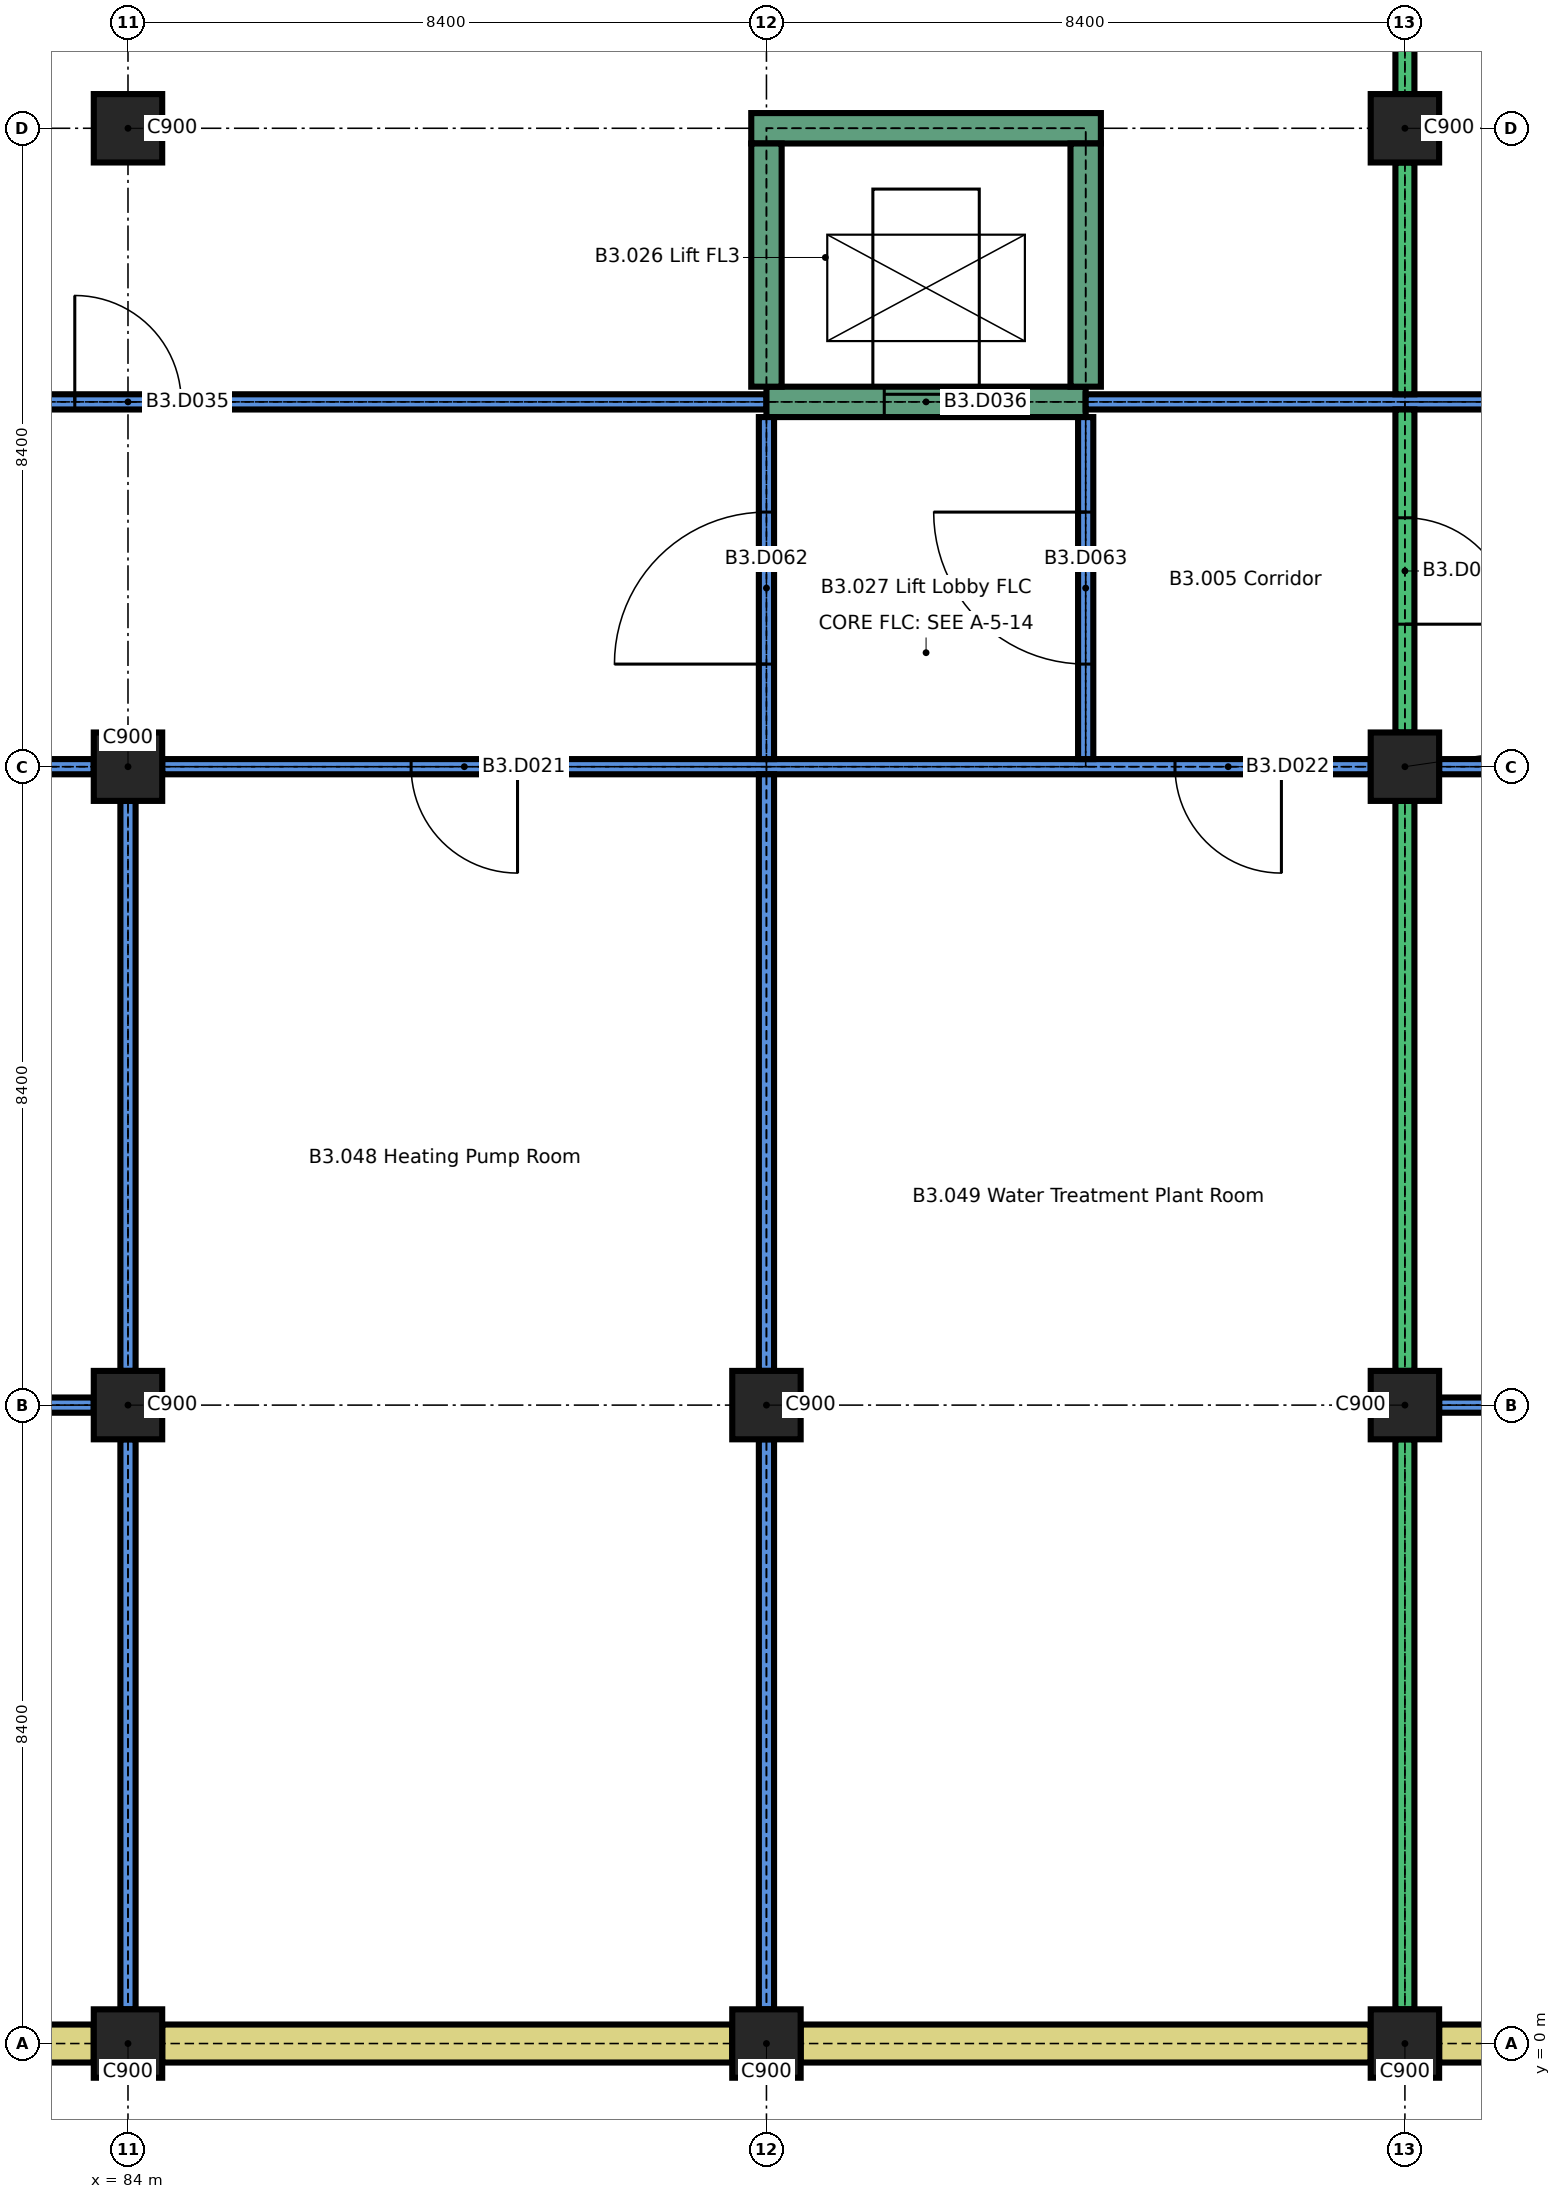
"""IFC4 building model, lengths in metres.
Left out: names, types, materials, properties, quantities, classifications, styles, units other than length and angle.
Written with IfcOpenShell. Run it as: python <this file> out.ifc"""

import sys

from ifc_helpers import new_model, si_unit, direction, frame, frame_2d, origin, origin_2d, place, context, subcontext, project, spatial, rectangle, extrude, element, fill, save


model = new_model("IFC4")
c1 = context("Model", 3, precision=1e-05, world=origin(), true_north=direction((0.0, 1.0)))
c2 = subcontext(c1, "Body", "Model", "MODEL_VIEW")
j1 = project(units=[si_unit("LENGTHUNIT", "METRE"), si_unit("PLANEANGLEUNIT", "RADIAN")], contexts=[c1])
p1 = place(None, origin())
s1 = spatial("IfcSite", under=j1, at=p1, CompositionType="ELEMENT")
p2 = place(p1, origin())
s2 = spatial("IfcBuilding", under=s1, at=p2, CompositionType="ELEMENT")
p3 = place(p2, frame((0.0, 0.0, -11.4)))
s3 = spatial("IfcBuildingStorey", under=s2, at=p3, CompositionType="ELEMENT", Elevation=-11.4)
for number, where, z_axis, x_axis in (
    (1, (84.0, 0.0, 0.0), (0.0, 0.0, 1.0), (1.0, 0.0, 0.0)),
    (2, (92.4, 0.0, 0.0), (0.0, 0.0, 1.0), (1.0, 0.0, 0.0)),
    (3, (100.8, 0.0, 0.0), (0.0, 0.0, 1.0), (1.0, 0.0, 0.0)),
    (4, (84.0, 8.4, 0.0), (0.0, 0.0, 1.0), (1.0, 0.0, 0.0)),
    (5, (92.4, 8.4, 0.0), (0.0, 0.0, 1.0), (1.0, 0.0, 0.0)),
    (6, (100.8, 8.4, 0.0), (0.0, 0.0, 1.0), (1.0, 0.0, 0.0)),
    (7, (84.0, 16.8, 0.0), (0.0, 0.0, 1.0), (1.0, 0.0, 0.0)),
    (8, (100.8, 16.8, 0.0), (0.0, 0.0, 1.0), (1.0, 0.0, 0.0)),
    (9, (84.0, 25.2, 0.0), (0.0, 0.0, 1.0), (1.0, 0.0, 0.0)),
    (10, (100.8, 25.2, 0.0), (0.0, 0.0, 1.0), (1.0, 0.0, 0.0)),
):
    element("IfcColumn", number, at=place(p3, frame(where, z_axis=z_axis, x_axis=x_axis)), inside=s3, PredefinedType="COLUMN", context=c2, shape_type="SweptSolid", body=[
        extrude(rectangle(XDim=0.9, YDim=0.9, at=origin_2d()), origin(), (0.0, 0.0, 1.0), 3.2),
    ])
for number, where, z_axis, x_axis in (
    (11, (76.05, 0.0, 0.0), (0.0, 0.0, 1.0), (1.0, 0.0, 0.0)),
    (12, (84.45, 0.0, 0.0), (0.0, 0.0, 1.0), (1.0, 0.0, 0.0)),
    (13, (92.85, 0.0, 0.0), (0.0, 0.0, 1.0), (1.0, 0.0, 0.0)),
    (14, (101.25, 0.0, 0.0), (0.0, 0.0, 1.0), (1.0, 0.0, 0.0)),
):
    element("IfcWall", number, at=place(p3, frame(where, z_axis=z_axis, x_axis=x_axis)), inside=s3, PredefinedType="SOLIDWALL", context=c2, shape_type="SweptSolid", body=[
        extrude(rectangle(XDim=7.5, YDim=0.5, at=frame_2d((3.75, 0.0))), origin(), (0.0, 0.0, 1.0), 3.2),
    ])
p4 = place(p3, frame((76.05, 8.4, 0.0), z_axis=(0.0, 0.0, 1.0), x_axis=(1.0, 0.0, 0.0)))
e15 = element("IfcWall", 15, at=p4, inside=s3, PredefinedType="PARTITIONING", context=c2, shape_type="SweptSolid", body=[
    extrude(rectangle(XDim=7.5, YDim=0.2, at=frame_2d((3.75, 0.0))), origin(), (0.0, 0.0, 1.0), 3.2),
])
p5 = place(p4, frame((3.05, 0.0, 0.0)))
e16 = element("IfcOpeningElement", 16, at=p5, cuts=e15, PredefinedType="OPENING", context=c2, shape_type="SweptSolid", body=[
    extrude(rectangle(XDim=1.4, YDim=2.1, at=frame_2d((0.7, 1.05))), frame((0.0, 0.11, 0.0), z_axis=(0.0, -1.0, 0.0), x_axis=(1.0, 0.0, 0.0)), (0.0, 0.0, 1.0), 0.22),
])
p6 = place(p3, frame((101.25, 8.4, 0.0), z_axis=(0.0, 0.0, 1.0), x_axis=(1.0, 0.0, 0.0)))
e17 = element("IfcWall", 17, at=p6, inside=s3, PredefinedType="PARTITIONING", context=c2, shape_type="SweptSolid", body=[
    extrude(rectangle(XDim=7.5, YDim=0.2, at=frame_2d((3.75, 0.0))), origin(), (0.0, 0.0, 1.0), 3.2),
])
p7 = place(p6, frame((3.05, 0.0, 0.0)))
e18 = element("IfcOpeningElement", 18, at=p7, cuts=e17, PredefinedType="OPENING", context=c2, shape_type="SweptSolid", body=[
    extrude(rectangle(XDim=1.4, YDim=2.1, at=frame_2d((0.7, 1.05))), frame((0.0, 0.11, 0.0), z_axis=(0.0, -1.0, 0.0), x_axis=(1.0, 0.0, 0.0)), (0.0, 0.0, 1.0), 0.22),
])
p8 = place(p3, frame((76.05, 16.8, 0.0), z_axis=(0.0, 0.0, 1.0), x_axis=(1.0, 0.0, 0.0)))
e19 = element("IfcWall", 19, at=p8, inside=s3, PredefinedType="PARTITIONING", context=c2, shape_type="SweptSolid", body=[
    extrude(rectangle(XDim=7.5, YDim=0.2, at=frame_2d((3.75, 0.0))), origin(), (0.0, 0.0, 1.0), 3.2),
])
p9 = place(p8, frame((3.05, 0.0, 0.0)))
e20 = element("IfcOpeningElement", 20, at=p9, cuts=e19, PredefinedType="OPENING", context=c2, shape_type="SweptSolid", body=[
    extrude(rectangle(XDim=1.4, YDim=2.1, at=frame_2d((0.7, 1.05))), frame((0.0, 0.11, 0.0), z_axis=(0.0, -1.0, 0.0), x_axis=(1.0, 0.0, 0.0)), (0.0, 0.0, 1.0), 0.22),
])
p10 = place(p3, frame((84.45, 16.8, 0.0), z_axis=(0.0, 0.0, 1.0), x_axis=(1.0, 0.0, 0.0)))
e21 = element("IfcWall", 21, at=p10, inside=s3, PredefinedType="PARTITIONING", context=c2, shape_type="SweptSolid", body=[
    extrude(rectangle(XDim=15.9, YDim=0.2, at=frame_2d((7.95, 0.0))), origin(), (0.0, 0.0, 1.0), 3.2),
])
p11 = place(p10, frame((3.275, 0.0, 0.0)))
e22 = element("IfcOpeningElement", 22, at=p11, cuts=e21, PredefinedType="OPENING", context=c2, shape_type="SweptSolid", body=[
    extrude(rectangle(XDim=1.4, YDim=2.1, at=frame_2d((0.7, 1.05))), frame((0.0, 0.11, 0.0), z_axis=(0.0, -1.0, 0.0), x_axis=(1.0, 0.0, 0.0)), (0.0, 0.0, 1.0), 0.22),
])
p12 = place(p10, frame((13.325, 0.0, 0.0)))
e23 = element("IfcOpeningElement", 23, at=p12, cuts=e21, PredefinedType="OPENING", context=c2, shape_type="SweptSolid", body=[
    extrude(rectangle(XDim=1.4, YDim=2.1, at=frame_2d((0.7, 1.05))), frame((0.0, 0.11, 0.0), z_axis=(0.0, -1.0, 0.0), x_axis=(1.0, 0.0, 0.0)), (0.0, 0.0, 1.0), 0.22),
])
p13 = place(p3, frame((101.25, 16.8, 0.0), z_axis=(0.0, 0.0, 1.0), x_axis=(1.0, 0.0, 0.0)))
e24 = element("IfcWall", 24, at=p13, inside=s3, PredefinedType="PARTITIONING", context=c2, shape_type="SweptSolid", body=[
    extrude(rectangle(XDim=7.5, YDim=0.2, at=frame_2d((3.75, 0.0))), origin(), (0.0, 0.0, 1.0), 3.2),
])
p14 = place(p13, frame((3.05, 0.0, 0.0)))
e25 = element("IfcOpeningElement", 25, at=p14, cuts=e24, PredefinedType="OPENING", context=c2, shape_type="SweptSolid", body=[
    extrude(rectangle(XDim=1.4, YDim=2.1, at=frame_2d((0.7, 1.05))), frame((0.0, 0.11, 0.0), z_axis=(0.0, -1.0, 0.0), x_axis=(1.0, 0.0, 0.0)), (0.0, 0.0, 1.0), 0.22),
])
p15 = place(p3, frame((75.5, 21.6, 0.0), z_axis=(0.0, 0.0, 1.0), x_axis=(1.0, 0.0, 0.0)))
e26 = element("IfcWall", 26, at=p15, inside=s3, PredefinedType="PARTITIONING", context=c2, shape_type="SweptSolid", body=[
    extrude(rectangle(XDim=16.9, YDim=0.2, at=frame_2d((8.45, 0.0))), origin(), (0.0, 0.0, 1.0), 3.2),
])
p16 = place(p15, frame((7.8, 0.0, 0.0)))
e27 = element("IfcOpeningElement", 27, at=p16, cuts=e26, PredefinedType="OPENING", context=c2, shape_type="SweptSolid", body=[
    extrude(rectangle(XDim=1.4, YDim=2.1, at=frame_2d((0.7, 1.05))), frame((0.0, 0.11, 0.0), z_axis=(0.0, -1.0, 0.0), x_axis=(1.0, 0.0, 0.0)), (0.0, 0.0, 1.0), 0.22),
])
p17 = place(p3, frame((92.4, 21.6, 0.0), z_axis=(0.0, 0.0, 1.0), x_axis=(1.0, 0.0, 0.0)))
e28 = element("IfcWall", 28, at=p17, inside=s3, PredefinedType="SHEAR", context=c2, shape_type="SweptSolid", body=[
    extrude(rectangle(XDim=4.2, YDim=0.4, at=frame_2d((2.1, 0.0))), origin(), (0.0, 0.0, 1.0), 3.2),
])
p18 = place(p17, frame((1.55, 0.0, 0.0)))
e29 = element("IfcOpeningElement", 29, at=p18, cuts=e28, PredefinedType="OPENING", context=c2, shape_type="SweptSolid", body=[
    extrude(rectangle(XDim=1.1, YDim=2.1, at=frame_2d((0.55, 1.05))), frame((0.0, 0.21, 0.0), z_axis=(0.0, -1.0, 0.0), x_axis=(1.0, 0.0, 0.0)), (0.0, 0.0, 1.0), 0.42),
])
p19 = place(p3, frame((96.6, 21.6, 0.0), z_axis=(0.0, 0.0, 1.0), x_axis=(1.0, 0.0, 0.0)))
e30 = element("IfcWall", 30, at=p19, inside=s3, PredefinedType="PARTITIONING", context=c2, shape_type="SweptSolid", body=[
    extrude(rectangle(XDim=8.5, YDim=0.2, at=frame_2d((4.25, 0.0))), origin(), (0.0, 0.0, 1.0), 3.2),
])
p20 = place(p19, frame((5.6, 0.0, 0.0)))
e31 = element("IfcOpeningElement", 31, at=p20, cuts=e30, PredefinedType="OPENING", context=c2, shape_type="SweptSolid", body=[
    extrude(rectangle(XDim=1.4, YDim=2.1, at=frame_2d((0.7, 1.05))), frame((0.0, 0.11, 0.0), z_axis=(0.0, -1.0, 0.0), x_axis=(1.0, 0.0, 0.0)), (0.0, 0.0, 1.0), 0.22),
])
p21 = place(p3, frame((92.2, 25.2, 0.0), z_axis=(0.0, 0.0, 1.0), x_axis=(1.0, 0.0, 0.0)))
e32 = element("IfcWall", 32, at=p21, inside=s3, PredefinedType="SHEAR", context=c2, shape_type="SweptSolid", body=[
    extrude(rectangle(XDim=4.6, YDim=0.4, at=frame_2d((2.3, 0.0))), origin(), (0.0, 0.0, 1.0), 3.2),
])
for number, where, z_axis, x_axis in (
    (33, (84.0, 0.45, 0.0), (0.0, 0.0, 1.0), (0.0, 1.0, 0.0)),
    (34, (84.0, 8.85, 0.0), (0.0, 0.0, 1.0), (0.0, 1.0, 0.0)),
    (35, (92.4, 0.45, 0.0), (0.0, 0.0, 1.0), (0.0, 1.0, 0.0)),
):
    element("IfcWall", number, at=place(p3, frame(where, z_axis=z_axis, x_axis=x_axis)), inside=s3, PredefinedType="PARTITIONING", context=c2, shape_type="SweptSolid", body=[
        extrude(rectangle(XDim=7.5, YDim=0.2, at=frame_2d((3.75, 0.0))), origin(), (0.0, 0.0, 1.0), 3.2),
    ])
p22 = place(p3, frame((92.4, 8.85, 0.0), z_axis=(0.0, 0.0, 1.0), x_axis=(0.0, 1.0, 0.0)))
e36 = element("IfcWall", 36, at=p22, inside=s3, PredefinedType="PARTITIONING", context=c2, shape_type="SweptSolid", body=[
    extrude(rectangle(XDim=7.85, YDim=0.2, at=frame_2d((3.925, 0.0))), origin(), (0.0, 0.0, 1.0), 3.2),
])
p23 = place(p3, frame((92.4, 16.9, 0.0), z_axis=(0.0, 0.0, 1.0), x_axis=(0.0, 1.0, 0.0)))
e37 = element("IfcWall", 37, at=p23, inside=s3, PredefinedType="PARTITIONING", context=c2, shape_type="SweptSolid", body=[
    extrude(rectangle(XDim=4.5, YDim=0.2, at=frame_2d((2.25, 0.0))), origin(), (0.0, 0.0, 1.0), 3.2),
])
p24 = place(p23, frame((1.25, 0.0, 0.0)))
e38 = element("IfcOpeningElement", 38, at=p24, cuts=e37, PredefinedType="OPENING", context=c2, shape_type="SweptSolid", body=[
    extrude(rectangle(XDim=2.0, YDim=2.4, at=frame_2d((1.0, 1.2))), frame((0.0, 0.11, 0.0), z_axis=(0.0, -1.0, 0.0), x_axis=(1.0, 0.0, 0.0)), (0.0, 0.0, 1.0), 0.22),
])
p25 = place(p3, frame((92.4, 21.8, 0.0), z_axis=(0.0, 0.0, 1.0), x_axis=(0.0, 1.0, 0.0)))
e39 = element("IfcWall", 39, at=p25, inside=s3, PredefinedType="SHEAR", context=c2, shape_type="SweptSolid", body=[
    extrude(rectangle(XDim=3.2, YDim=0.4, at=frame_2d((1.6, 0.0))), origin(), (0.0, 0.0, 1.0), 3.2),
])
p26 = place(p3, frame((96.6, 16.9, 0.0), z_axis=(0.0, 0.0, 1.0), x_axis=(0.0, 1.0, 0.0)))
e40 = element("IfcWall", 40, at=p26, inside=s3, PredefinedType="PARTITIONING", context=c2, shape_type="SweptSolid", body=[
    extrude(rectangle(XDim=4.5, YDim=0.2, at=frame_2d((2.25, 0.0))), origin(), (0.0, 0.0, 1.0), 3.2),
])
p27 = place(p26, frame((1.25, 0.0, 0.0)))
e41 = element("IfcOpeningElement", 41, at=p27, cuts=e40, PredefinedType="OPENING", context=c2, shape_type="SweptSolid", body=[
    extrude(rectangle(XDim=2.0, YDim=2.4, at=frame_2d((1.0, 1.2))), frame((0.0, 0.11, 0.0), z_axis=(0.0, -1.0, 0.0), x_axis=(1.0, 0.0, 0.0)), (0.0, 0.0, 1.0), 0.22),
])
p28 = place(p3, frame((96.6, 21.8, 0.0), z_axis=(0.0, 0.0, 1.0), x_axis=(0.0, 1.0, 0.0)))
e42 = element("IfcWall", 42, at=p28, inside=s3, PredefinedType="SHEAR", context=c2, shape_type="SweptSolid", body=[
    extrude(rectangle(XDim=3.2, YDim=0.4, at=frame_2d((1.6, 0.0))), origin(), (0.0, 0.0, 1.0), 3.2),
])
for number, where, z_axis, x_axis in (
    (43, (100.8, 0.45, 0.0), (0.0, 0.0, 1.0), (0.0, 1.0, 0.0)),
    (44, (100.8, 8.85, 0.0), (0.0, 0.0, 1.0), (0.0, 1.0, 0.0)),
):
    element("IfcWall", number, at=place(p3, frame(where, z_axis=z_axis, x_axis=x_axis)), inside=s3, PredefinedType="SOLIDWALL", context=c2, shape_type="SweptSolid", body=[
        extrude(rectangle(XDim=7.5, YDim=0.25, at=frame_2d((3.75, 0.0))), origin(), (0.0, 0.0, 1.0), 3.2),
    ])
p29 = place(p3, frame((100.8, 17.25, 0.0), z_axis=(0.0, 0.0, 1.0), x_axis=(0.0, 1.0, 0.0)))
e45 = element("IfcWall", 45, at=p29, inside=s3, PredefinedType="SOLIDWALL", context=c2, shape_type="SweptSolid", body=[
    extrude(rectangle(XDim=4.25, YDim=0.25, at=frame_2d((2.125, 0.0))), origin(), (0.0, 0.0, 1.0), 3.2),
])
p30 = place(p29, frame((1.425, 0.0, 0.0)))
e46 = element("IfcOpeningElement", 46, at=p30, cuts=e45, PredefinedType="OPENING", context=c2, shape_type="SweptSolid", body=[
    extrude(rectangle(XDim=1.4, YDim=2.1, at=frame_2d((0.7, 1.05))), frame((0.0, 0.135, 0.0), z_axis=(0.0, -1.0, 0.0), x_axis=(1.0, 0.0, 0.0)), (0.0, 0.0, 1.0), 0.27),
])
p31 = place(p3, frame((100.8, 21.7, 0.0), z_axis=(0.0, 0.0, 1.0), x_axis=(0.0, 1.0, 0.0)))
e47 = element("IfcWall", 47, at=p31, inside=s3, PredefinedType="SOLIDWALL", context=c2, shape_type="SweptSolid", body=[
    extrude(rectangle(XDim=3.05, YDim=0.25, at=frame_2d((1.525, 0.0))), origin(), (0.0, 0.0, 1.0), 3.2),
])
p32 = place(p3, frame((100.8, 25.65, 0.0), z_axis=(0.0, 0.0, 1.0), x_axis=(0.0, 1.0, 0.0)))
e48 = element("IfcWall", 48, at=p32, inside=s3, PredefinedType="SOLIDWALL", context=c2, shape_type="SweptSolid", body=[
    extrude(rectangle(XDim=7.5, YDim=0.25, at=frame_2d((3.75, 0.0))), origin(), (0.0, 0.0, 1.0), 3.2),
])
p33 = place(p11, origin())
e49 = element("IfcDoor", 49, at=p33, inside=s3, OperationType="SINGLE_SWING_RIGHT", PredefinedType="DOOR", context=c2, shape_type="SweptSolid", body=[
    extrude(rectangle(XDim=1.4, YDim=2.1, at=frame_2d((0.7, 1.05))), frame((0.0, 0.025, 0.0), z_axis=(0.0, -1.0, 0.0), x_axis=(1.0, 0.0, 0.0)), (0.0, 0.0, 1.0), 0.05),
])
fill(e22, e49)
p34 = place(p12, origin())
e50 = element("IfcDoor", 50, at=p34, inside=s3, OperationType="SINGLE_SWING_RIGHT", PredefinedType="DOOR", context=c2, shape_type="SweptSolid", body=[
    extrude(rectangle(XDim=1.4, YDim=2.1, at=frame_2d((0.7, 1.05))), frame((0.0, 0.025, 0.0), z_axis=(0.0, -1.0, 0.0), x_axis=(1.0, 0.0, 0.0)), (0.0, 0.0, 1.0), 0.05),
])
fill(e23, e50)
p35 = place(p16, origin())
e51 = element("IfcDoor", 51, at=p35, inside=s3, OperationType="SINGLE_SWING_RIGHT", PredefinedType="DOOR", context=c2, shape_type="SweptSolid", body=[
    extrude(rectangle(XDim=1.4, YDim=2.1, at=frame_2d((0.7, 1.05))), frame((0.0, 0.025, 0.0), z_axis=(0.0, -1.0, 0.0), x_axis=(1.0, 0.0, 0.0)), (0.0, 0.0, 1.0), 0.05),
])
fill(e27, e51)
p36 = place(p18, origin())
e52 = element("IfcDoor", 52, at=p36, inside=s3, OperationType="SLIDING_TO_LEFT", PredefinedType="DOOR", context=c2, shape_type="SweptSolid", body=[
    extrude(rectangle(XDim=1.1, YDim=2.1, at=frame_2d((0.55, 1.05))), frame((0.0, 0.025, 0.0), z_axis=(0.0, -1.0, 0.0), x_axis=(1.0, 0.0, 0.0)), (0.0, 0.0, 1.0), 0.05),
])
fill(e29, e52)
p37 = place(p24, origin())
e53 = element("IfcDoor", 53, at=p37, inside=s3, OperationType="SINGLE_SWING_RIGHT", PredefinedType="DOOR", context=c2, shape_type="SweptSolid", body=[
    extrude(rectangle(XDim=2.0, YDim=2.4, at=frame_2d((1.0, 1.2))), frame((0.0, 0.03, 0.0), z_axis=(0.0, -1.0, 0.0), x_axis=(1.0, 0.0, 0.0)), (0.0, 0.0, 1.0), 0.06),
])
fill(e38, e53)
p38 = place(p27, origin())
e54 = element("IfcDoor", 54, at=p38, inside=s3, OperationType="SINGLE_SWING_LEFT", PredefinedType="DOOR", context=c2, shape_type="SweptSolid", body=[
    extrude(rectangle(XDim=2.0, YDim=2.4, at=frame_2d((1.0, 1.2))), frame((0.0, 0.03, 0.0), z_axis=(0.0, -1.0, 0.0), x_axis=(1.0, 0.0, 0.0)), (0.0, 0.0, 1.0), 0.06),
])
fill(e41, e54)
p39 = place(p30, origin())
e55 = element("IfcDoor", 55, at=p39, inside=s3, OperationType="SINGLE_SWING_LEFT", PredefinedType="DOOR", context=c2, shape_type="SweptSolid", body=[
    extrude(rectangle(XDim=1.4, YDim=2.1, at=frame_2d((0.7, 1.05))), frame((0.0, 0.03, 0.0), z_axis=(0.0, -1.0, 0.0), x_axis=(1.0, 0.0, 0.0)), (0.0, 0.0, 1.0), 0.06),
])
fill(e46, e55)
save(model, sys.argv[1])
